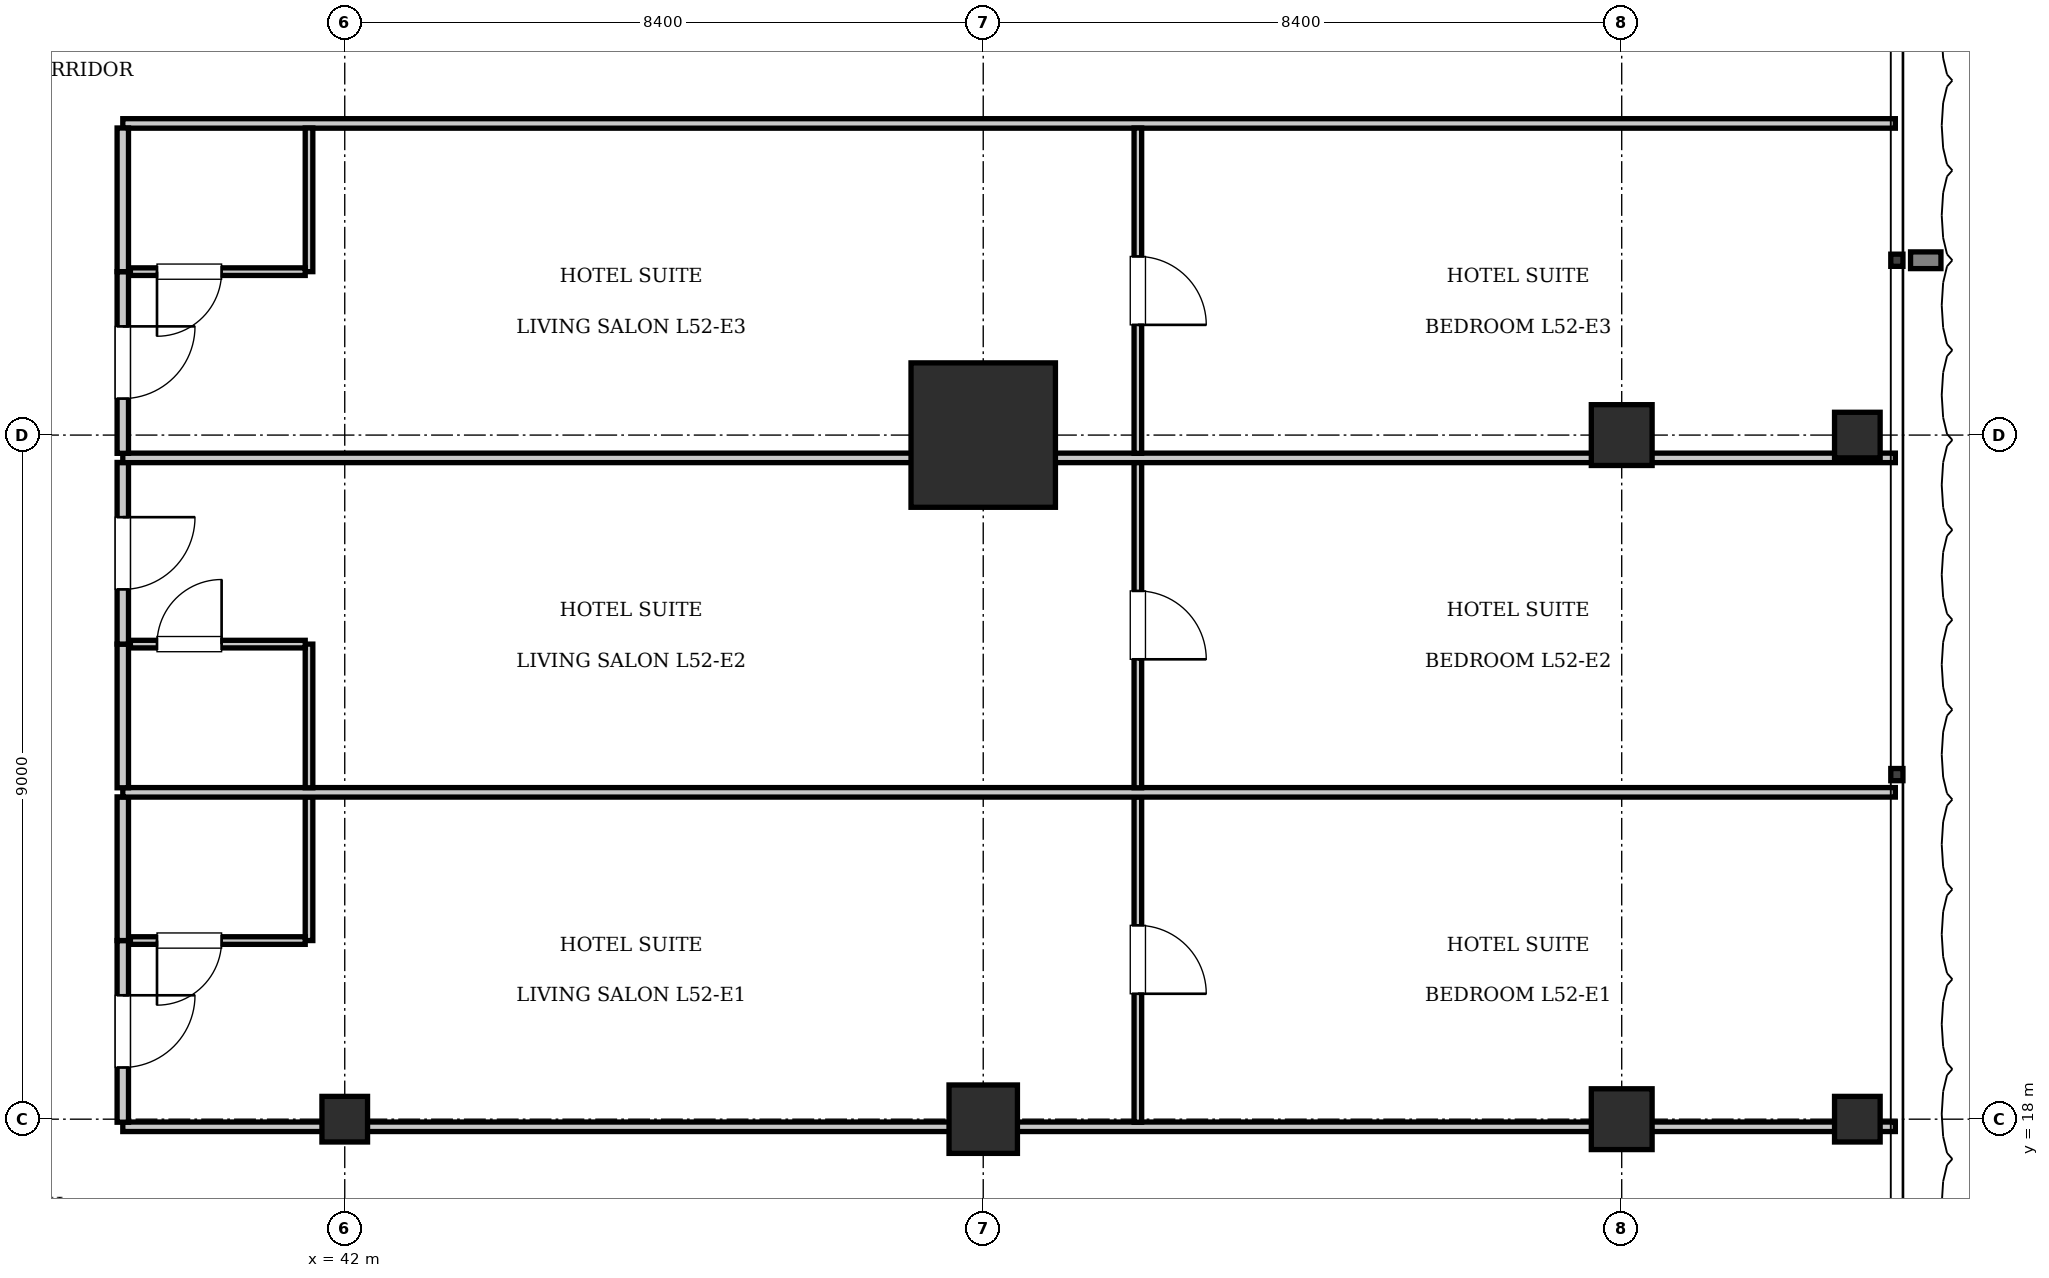
"""IFC4 building model, lengths in metres.
Left out: names, types, materials, properties, quantities, classifications, styles, units other than length and angle.
Written with IfcOpenShell. Run it as: python <this file> out.ifc"""

import sys

from ifc_helpers import new_model, si_unit, direction, frame, frame_2d, origin, origin_2d, place, context, subcontext, project, spatial, rectangle, i_section, extrude, element, fill, save


model = new_model("IFC4")
c1 = context("Model", 3, precision=1e-05, world=origin(), true_north=direction((0.0, 1.0)))
c2 = subcontext(c1, "Body", "Model", "MODEL_VIEW")
j1 = project(units=[si_unit("LENGTHUNIT", "METRE"), si_unit("PLANEANGLEUNIT", "RADIAN")], contexts=[c1])
p1 = place(None, origin())
s1 = spatial("IfcSite", under=j1, at=p1, CompositionType="ELEMENT")
p2 = place(p1, origin())
s2 = spatial("IfcBuilding", under=s1, at=p2, CompositionType="ELEMENT")
p3 = place(p2, frame((0.0, 0.0, 212.1)))
s3 = spatial("IfcBuildingStorey", under=s2, at=p3, CompositionType="ELEMENT", Elevation=212.1)
p4 = place(p3, frame((50.4, 27.0, 0.0), z_axis=(0.0, 0.0, 1.0), x_axis=(1.0, 0.0, 0.0)))
e1 = element("IfcColumn", 1, at=p4, inside=s3, PredefinedType="COLUMN", context=c2, shape_type="SweptSolid", body=[
    extrude(rectangle(XDim=1.9, YDim=1.9, at=origin_2d()), origin(), (0.0, 0.0, 1.0), 3.85),
])
p5 = place(p3, frame((50.4, 18.0, 0.0), z_axis=(0.0, 0.0, 1.0), x_axis=(1.0, 0.0, 0.0)))
e2 = element("IfcColumn", 2, at=p5, inside=s3, PredefinedType="COLUMN", context=c2, shape_type="SweptSolid", body=[
    extrude(rectangle(XDim=0.9, YDim=0.9, at=origin_2d()), origin(), (0.0, 0.0, 1.0), 3.85),
])
p6 = place(p3, frame((42.0, 18.0, 0.0), z_axis=(0.0, 0.0, 1.0), x_axis=(1.0, 0.0, 0.0)))
e3 = element("IfcColumn", 3, at=p6, inside=s3, PredefinedType="COLUMN", context=c2, shape_type="SweptSolid", body=[
    extrude(i_section(OverallWidth=0.6, OverallDepth=0.6, WebThickness=0.025, FlangeThickness=0.038, at=origin_2d()), origin(), (0.0, 0.0, 1.0), 3.85),
])
for number, where, z_axis, x_axis in (
    (4, (58.8, 18.0, 0.0), (0.0, 0.0, 1.0), (1.0, 0.0, 0.0)),
    (5, (58.8, 27.0, 0.0), (0.0, 0.0, 1.0), (1.0, 0.0, 0.0)),
):
    element("IfcColumn", number, at=place(p3, frame(where, z_axis=z_axis, x_axis=x_axis)), inside=s3, PredefinedType="COLUMN", context=c2, shape_type="SweptSolid", body=[
        extrude(rectangle(XDim=0.8, YDim=0.8, at=origin_2d()), origin(), (0.0, 0.0, 1.0), 3.85),
    ])
for number, where, z_axis, x_axis in (
    (6, (61.9, 18.0, 0.0), (0.0, 0.0, 1.0), (1.0, 0.0, 0.0)),
    (7, (61.9, 27.0, 0.0), (0.0, 0.0, 1.0), (1.0, 0.0, 0.0)),
):
    element("IfcColumn", number, at=place(p3, frame(where, z_axis=z_axis, x_axis=x_axis)), inside=s3, PredefinedType="COLUMN", context=c2, shape_type="SweptSolid", body=[
        extrude(i_section(OverallWidth=0.6, OverallDepth=0.6, WebThickness=0.025, FlangeThickness=0.038, at=origin_2d()), origin(), (0.0, 0.0, 1.0), 3.85),
    ])
p7 = place(p3, frame((39.08, 17.9, 0.0), z_axis=(0.0, 0.0, 1.0), x_axis=(1.0, 0.0, 0.0)))
e8 = element("IfcWall", 8, at=p7, inside=s3, PredefinedType="PARTITIONING", context=c2, shape_type="SweptSolid", body=[
    extrude(rectangle(XDim=23.32, YDim=0.125, at=frame_2d((11.66, 0.0))), origin(), (0.0, 0.0, 1.0), 3.071),
])
p8 = place(p3, frame((39.08, 31.1, 0.0), z_axis=(0.0, 0.0, 1.0), x_axis=(1.0, 0.0, 0.0)))
e9 = element("IfcWall", 9, at=p8, inside=s3, PredefinedType="PARTITIONING", context=c2, shape_type="SweptSolid", body=[
    extrude(rectangle(XDim=23.32, YDim=0.125, at=frame_2d((11.66, 0.0))), origin(), (0.0, 0.0, 1.0), 3.61),
])
p9 = place(p3, frame((39.08, 17.96, 0.0), z_axis=(0.0, 0.0, 1.0), x_axis=(0.0, 1.0, 0.0)))
e10 = element("IfcWall", 10, at=p9, inside=s3, PredefinedType="PARTITIONING", context=c2, shape_type="SweptSolid", body=[
    extrude(rectangle(XDim=2.39, YDim=0.15, at=frame_2d((1.195, 0.0))), origin(), (0.0, 0.0, 1.0), 3.61),
])
p10 = place(p9, frame((0.72, 0.0, 0.0)))
e11 = element("IfcOpeningElement", 11, at=p10, cuts=e10, PredefinedType="OPENING", context=c2, shape_type="SweptSolid", body=[
    extrude(rectangle(XDim=0.95, YDim=2.15, at=frame_2d((0.475, 1.075))), frame((0.0, 0.085, 0.0), z_axis=(0.0, -1.0, 0.0), x_axis=(1.0, 0.0, 0.0)), (0.0, 0.0, 1.0), 0.17),
])
p11 = place(p3, frame((39.08, 20.35, 0.0), z_axis=(0.0, 0.0, 1.0), x_axis=(0.0, 1.0, 0.0)))
e12 = element("IfcWall", 12, at=p11, inside=s3, PredefinedType="PARTITIONING", context=c2, shape_type="SweptSolid", body=[
    extrude(rectangle(XDim=1.89, YDim=0.15, at=frame_2d((0.945, 0.0))), origin(), (0.0, 0.0, 1.0), 3.61),
])
p12 = place(p3, frame((41.53, 20.35, 0.0), z_axis=(0.0, 0.0, 1.0), x_axis=(0.0, 1.0, 0.0)))
e13 = element("IfcWall", 13, at=p12, inside=s3, PredefinedType="PARTITIONING", context=c2, shape_type="SweptSolid", body=[
    extrude(rectangle(XDim=1.89, YDim=0.1, at=frame_2d((0.945, 0.0))), origin(), (0.0, 0.0, 1.0), 3.61),
])
p13 = place(p3, frame((39.18, 20.35, 0.0), z_axis=(0.0, 0.0, 1.0), x_axis=(1.0, 0.0, 0.0)))
e14 = element("IfcWall", 14, at=p13, inside=s3, PredefinedType="PARTITIONING", context=c2, shape_type="SweptSolid", body=[
    extrude(rectangle(XDim=2.3, YDim=0.1, at=frame_2d((1.15, 0.0))), origin(), (0.0, 0.0, 1.0), 3.61),
])
p14 = place(p13, frame((0.35, 0.0, 0.0)))
e15 = element("IfcOpeningElement", 15, at=p14, cuts=e14, PredefinedType="OPENING", context=c2, shape_type="SweptSolid", body=[
    extrude(rectangle(XDim=0.85, YDim=2.1, at=frame_2d((0.425, 1.05))), frame((0.0, 0.06, 0.0), z_axis=(0.0, -1.0, 0.0), x_axis=(1.0, 0.0, 0.0)), (0.0, 0.0, 1.0), 0.12),
])
p15 = place(p3, frame((52.434, 17.96, 0.0), z_axis=(0.0, 0.0, 1.0), x_axis=(0.0, 1.0, 0.0)))
e16 = element("IfcWall", 16, at=p15, inside=s3, PredefinedType="PARTITIONING", context=c2, shape_type="SweptSolid", body=[
    extrude(rectangle(XDim=4.28, YDim=0.1, at=frame_2d((2.14, 0.0))), origin(), (0.0, 0.0, 1.0), 3.61),
])
p16 = place(p15, frame((1.69, 0.0, 0.0)))
e17 = element("IfcOpeningElement", 17, at=p16, cuts=e16, PredefinedType="OPENING", context=c2, shape_type="SweptSolid", body=[
    extrude(rectangle(XDim=0.9, YDim=2.1, at=frame_2d((0.45, 1.05))), frame((0.0, 0.06, 0.0), z_axis=(0.0, -1.0, 0.0), x_axis=(1.0, 0.0, 0.0)), (0.0, 0.0, 1.0), 0.12),
])
p17 = place(p3, frame((39.08, 22.3, 0.0), z_axis=(0.0, 0.0, 1.0), x_axis=(1.0, 0.0, 0.0)))
e18 = element("IfcWall", 18, at=p17, inside=s3, PredefinedType="PARTITIONING", context=c2, shape_type="SweptSolid", body=[
    extrude(rectangle(XDim=23.32, YDim=0.125, at=frame_2d((11.66, 0.0))), origin(), (0.0, 0.0, 1.0), 3.61),
])
p18 = place(p3, frame((39.08, 22.36, 0.0), z_axis=(0.0, 0.0, 1.0), x_axis=(0.0, 1.0, 0.0)))
e19 = element("IfcWall", 19, at=p18, inside=s3, PredefinedType="PARTITIONING", context=c2, shape_type="SweptSolid", body=[
    extrude(rectangle(XDim=1.89, YDim=0.15, at=frame_2d((0.945, 0.0))), origin(), (0.0, 0.0, 1.0), 3.61),
])
p19 = place(p3, frame((39.08, 24.25, 0.0), z_axis=(0.0, 0.0, 1.0), x_axis=(0.0, 1.0, 0.0)))
e20 = element("IfcWall", 20, at=p19, inside=s3, PredefinedType="PARTITIONING", context=c2, shape_type="SweptSolid", body=[
    extrude(rectangle(XDim=2.39, YDim=0.15, at=frame_2d((1.195, 0.0))), origin(), (0.0, 0.0, 1.0), 3.61),
])
p20 = place(p19, frame((0.72, 0.0, 0.0)))
e21 = element("IfcOpeningElement", 21, at=p20, cuts=e20, PredefinedType="OPENING", context=c2, shape_type="SweptSolid", body=[
    extrude(rectangle(XDim=0.95, YDim=2.15, at=frame_2d((0.475, 1.075))), frame((0.0, 0.085, 0.0), z_axis=(0.0, -1.0, 0.0), x_axis=(1.0, 0.0, 0.0)), (0.0, 0.0, 1.0), 0.17),
])
p21 = place(p3, frame((41.53, 22.36, 0.0), z_axis=(0.0, 0.0, 1.0), x_axis=(0.0, 1.0, 0.0)))
e22 = element("IfcWall", 22, at=p21, inside=s3, PredefinedType="PARTITIONING", context=c2, shape_type="SweptSolid", body=[
    extrude(rectangle(XDim=1.89, YDim=0.1, at=frame_2d((0.945, 0.0))), origin(), (0.0, 0.0, 1.0), 3.61),
])
p22 = place(p3, frame((39.18, 24.25, 0.0), z_axis=(0.0, 0.0, 1.0), x_axis=(1.0, 0.0, 0.0)))
e23 = element("IfcWall", 23, at=p22, inside=s3, PredefinedType="PARTITIONING", context=c2, shape_type="SweptSolid", body=[
    extrude(rectangle(XDim=2.3, YDim=0.1, at=frame_2d((1.15, 0.0))), origin(), (0.0, 0.0, 1.0), 3.61),
])
p23 = place(p22, frame((0.35, 0.0, 0.0)))
e24 = element("IfcOpeningElement", 24, at=p23, cuts=e23, PredefinedType="OPENING", context=c2, shape_type="SweptSolid", body=[
    extrude(rectangle(XDim=0.85, YDim=2.1, at=frame_2d((0.425, 1.05))), frame((0.0, 0.06, 0.0), z_axis=(0.0, -1.0, 0.0), x_axis=(1.0, 0.0, 0.0)), (0.0, 0.0, 1.0), 0.12),
])
p24 = place(p3, frame((52.434, 22.36, 0.0), z_axis=(0.0, 0.0, 1.0), x_axis=(0.0, 1.0, 0.0)))
e25 = element("IfcWall", 25, at=p24, inside=s3, PredefinedType="PARTITIONING", context=c2, shape_type="SweptSolid", body=[
    extrude(rectangle(XDim=4.28, YDim=0.1, at=frame_2d((2.14, 0.0))), origin(), (0.0, 0.0, 1.0), 3.61),
])
p25 = place(p24, frame((1.69, 0.0, 0.0)))
e26 = element("IfcOpeningElement", 26, at=p25, cuts=e25, PredefinedType="OPENING", context=c2, shape_type="SweptSolid", body=[
    extrude(rectangle(XDim=0.9, YDim=2.1, at=frame_2d((0.45, 1.05))), frame((0.0, 0.06, 0.0), z_axis=(0.0, -1.0, 0.0), x_axis=(1.0, 0.0, 0.0)), (0.0, 0.0, 1.0), 0.12),
])
p26 = place(p3, frame((39.08, 26.7, 0.0), z_axis=(0.0, 0.0, 1.0), x_axis=(1.0, 0.0, 0.0)))
e27 = element("IfcWall", 27, at=p26, inside=s3, PredefinedType="PARTITIONING", context=c2, shape_type="SweptSolid", body=[
    extrude(rectangle(XDim=23.32, YDim=0.125, at=frame_2d((11.66, 0.0))), origin(), (0.0, 0.0, 1.0), 3.61),
])
p27 = place(p3, frame((39.08, 26.76, 0.0), z_axis=(0.0, 0.0, 1.0), x_axis=(0.0, 1.0, 0.0)))
e28 = element("IfcWall", 28, at=p27, inside=s3, PredefinedType="PARTITIONING", context=c2, shape_type="SweptSolid", body=[
    extrude(rectangle(XDim=2.39, YDim=0.15, at=frame_2d((1.195, 0.0))), origin(), (0.0, 0.0, 1.0), 3.61),
])
p28 = place(p27, frame((0.72, 0.0, 0.0)))
e29 = element("IfcOpeningElement", 29, at=p28, cuts=e28, PredefinedType="OPENING", context=c2, shape_type="SweptSolid", body=[
    extrude(rectangle(XDim=0.95, YDim=2.15, at=frame_2d((0.475, 1.075))), frame((0.0, 0.085, 0.0), z_axis=(0.0, -1.0, 0.0), x_axis=(1.0, 0.0, 0.0)), (0.0, 0.0, 1.0), 0.17),
])
p29 = place(p3, frame((39.08, 29.15, 0.0), z_axis=(0.0, 0.0, 1.0), x_axis=(0.0, 1.0, 0.0)))
e30 = element("IfcWall", 30, at=p29, inside=s3, PredefinedType="PARTITIONING", context=c2, shape_type="SweptSolid", body=[
    extrude(rectangle(XDim=1.89, YDim=0.15, at=frame_2d((0.945, 0.0))), origin(), (0.0, 0.0, 1.0), 3.61),
])
p30 = place(p3, frame((41.53, 29.15, 0.0), z_axis=(0.0, 0.0, 1.0), x_axis=(0.0, 1.0, 0.0)))
e31 = element("IfcWall", 31, at=p30, inside=s3, PredefinedType="PARTITIONING", context=c2, shape_type="SweptSolid", body=[
    extrude(rectangle(XDim=1.89, YDim=0.1, at=frame_2d((0.945, 0.0))), origin(), (0.0, 0.0, 1.0), 3.61),
])
p31 = place(p3, frame((39.18, 29.15, 0.0), z_axis=(0.0, 0.0, 1.0), x_axis=(1.0, 0.0, 0.0)))
e32 = element("IfcWall", 32, at=p31, inside=s3, PredefinedType="PARTITIONING", context=c2, shape_type="SweptSolid", body=[
    extrude(rectangle(XDim=2.3, YDim=0.1, at=frame_2d((1.15, 0.0))), origin(), (0.0, 0.0, 1.0), 3.61),
])
p32 = place(p31, frame((0.35, 0.0, 0.0)))
e33 = element("IfcOpeningElement", 33, at=p32, cuts=e32, PredefinedType="OPENING", context=c2, shape_type="SweptSolid", body=[
    extrude(rectangle(XDim=0.85, YDim=2.1, at=frame_2d((0.425, 1.05))), frame((0.0, 0.06, 0.0), z_axis=(0.0, -1.0, 0.0), x_axis=(1.0, 0.0, 0.0)), (0.0, 0.0, 1.0), 0.12),
])
p33 = place(p3, frame((52.434, 26.76, 0.0), z_axis=(0.0, 0.0, 1.0), x_axis=(0.0, 1.0, 0.0)))
e34 = element("IfcWall", 34, at=p33, inside=s3, PredefinedType="PARTITIONING", context=c2, shape_type="SweptSolid", body=[
    extrude(rectangle(XDim=4.28, YDim=0.1, at=frame_2d((2.14, 0.0))), origin(), (0.0, 0.0, 1.0), 3.61),
])
p34 = place(p33, frame((1.69, 0.0, 0.0)))
e35 = element("IfcOpeningElement", 35, at=p34, cuts=e34, PredefinedType="OPENING", context=c2, shape_type="SweptSolid", body=[
    extrude(rectangle(XDim=0.9, YDim=2.1, at=frame_2d((0.45, 1.05))), frame((0.0, 0.06, 0.0), z_axis=(0.0, -1.0, 0.0), x_axis=(1.0, 0.0, 0.0)), (0.0, 0.0, 1.0), 0.12),
])
p35 = place(p14, frame((0.85, 0.0, 0.0), z_axis=(0.0, 0.0, 1.0), x_axis=(-1.0, 0.0, 0.0)))
e36 = element("IfcDoor", 36, at=p35, inside=s3, OperationType="SINGLE_SWING_RIGHT", PredefinedType="DOOR", context=c2, shape_type="SweptSolid", body=[
    extrude(rectangle(XDim=0.85, YDim=2.1, at=frame_2d((0.425, 1.05))), frame((0.0, 0.025, 0.0), z_axis=(0.0, -1.0, 0.0), x_axis=(1.0, 0.0, 0.0)), (0.0, 0.0, 1.0), 0.05),
])
fill(e15, e36)
p36 = place(p10, frame((0.95, 0.0, 0.0), z_axis=(0.0, 0.0, 1.0), x_axis=(-1.0, 0.0, 0.0)))
e37 = element("IfcDoor", 37, at=p36, inside=s3, OperationType="SINGLE_SWING_LEFT", PredefinedType="DOOR", context=c2, shape_type="SweptSolid", body=[
    extrude(rectangle(XDim=0.95, YDim=2.15, at=frame_2d((0.475, 1.075))), frame((0.0, 0.025, 0.0), z_axis=(0.0, -1.0, 0.0), x_axis=(1.0, 0.0, 0.0)), (0.0, 0.0, 1.0), 0.05),
])
fill(e11, e37)
p37 = place(p16, frame((0.9, 0.0, 0.0), z_axis=(0.0, 0.0, 1.0), x_axis=(-1.0, 0.0, 0.0)))
e38 = element("IfcDoor", 38, at=p37, inside=s3, OperationType="SINGLE_SWING_RIGHT", PredefinedType="DOOR", context=c2, shape_type="SweptSolid", body=[
    extrude(rectangle(XDim=0.9, YDim=2.1, at=frame_2d((0.45, 1.05))), frame((0.0, 0.025, 0.0), z_axis=(0.0, -1.0, 0.0), x_axis=(1.0, 0.0, 0.0)), (0.0, 0.0, 1.0), 0.05),
])
fill(e17, e38)
p38 = place(p23, origin())
e39 = element("IfcDoor", 39, at=p38, inside=s3, OperationType="SINGLE_SWING_RIGHT", PredefinedType="DOOR", context=c2, shape_type="SweptSolid", body=[
    extrude(rectangle(XDim=0.85, YDim=2.1, at=frame_2d((0.425, 1.05))), frame((0.0, 0.025, 0.0), z_axis=(0.0, -1.0, 0.0), x_axis=(1.0, 0.0, 0.0)), (0.0, 0.0, 1.0), 0.05),
])
fill(e24, e39)
p39 = place(p20, frame((0.95, 0.0, 0.0), z_axis=(0.0, 0.0, 1.0), x_axis=(-1.0, 0.0, 0.0)))
e40 = element("IfcDoor", 40, at=p39, inside=s3, OperationType="SINGLE_SWING_LEFT", PredefinedType="DOOR", context=c2, shape_type="SweptSolid", body=[
    extrude(rectangle(XDim=0.95, YDim=2.15, at=frame_2d((0.475, 1.075))), frame((0.0, 0.025, 0.0), z_axis=(0.0, -1.0, 0.0), x_axis=(1.0, 0.0, 0.0)), (0.0, 0.0, 1.0), 0.05),
])
fill(e21, e40)
p40 = place(p25, frame((0.9, 0.0, 0.0), z_axis=(0.0, 0.0, 1.0), x_axis=(-1.0, 0.0, 0.0)))
e41 = element("IfcDoor", 41, at=p40, inside=s3, OperationType="SINGLE_SWING_RIGHT", PredefinedType="DOOR", context=c2, shape_type="SweptSolid", body=[
    extrude(rectangle(XDim=0.9, YDim=2.1, at=frame_2d((0.45, 1.05))), frame((0.0, 0.025, 0.0), z_axis=(0.0, -1.0, 0.0), x_axis=(1.0, 0.0, 0.0)), (0.0, 0.0, 1.0), 0.05),
])
fill(e26, e41)
p41 = place(p32, frame((0.85, 0.0, 0.0), z_axis=(0.0, 0.0, 1.0), x_axis=(-1.0, 0.0, 0.0)))
e42 = element("IfcDoor", 42, at=p41, inside=s3, OperationType="SINGLE_SWING_RIGHT", PredefinedType="DOOR", context=c2, shape_type="SweptSolid", body=[
    extrude(rectangle(XDim=0.85, YDim=2.1, at=frame_2d((0.425, 1.05))), frame((0.0, 0.025, 0.0), z_axis=(0.0, -1.0, 0.0), x_axis=(1.0, 0.0, 0.0)), (0.0, 0.0, 1.0), 0.05),
])
fill(e33, e42)
p42 = place(p28, frame((0.95, 0.0, 0.0), z_axis=(0.0, 0.0, 1.0), x_axis=(-1.0, 0.0, 0.0)))
e43 = element("IfcDoor", 43, at=p42, inside=s3, OperationType="SINGLE_SWING_LEFT", PredefinedType="DOOR", context=c2, shape_type="SweptSolid", body=[
    extrude(rectangle(XDim=0.95, YDim=2.15, at=frame_2d((0.475, 1.075))), frame((0.0, 0.025, 0.0), z_axis=(0.0, -1.0, 0.0), x_axis=(1.0, 0.0, 0.0)), (0.0, 0.0, 1.0), 0.05),
])
fill(e29, e43)
p43 = place(p34, frame((0.9, 0.0, 0.0), z_axis=(0.0, 0.0, 1.0), x_axis=(-1.0, 0.0, 0.0)))
e44 = element("IfcDoor", 44, at=p43, inside=s3, OperationType="SINGLE_SWING_RIGHT", PredefinedType="DOOR", context=c2, shape_type="SweptSolid", body=[
    extrude(rectangle(XDim=0.9, YDim=2.1, at=frame_2d((0.45, 1.05))), frame((0.0, 0.025, 0.0), z_axis=(0.0, -1.0, 0.0), x_axis=(1.0, 0.0, 0.0)), (0.0, 0.0, 1.0), 0.05),
])
fill(e35, e44)
save(model, sys.argv[1])
